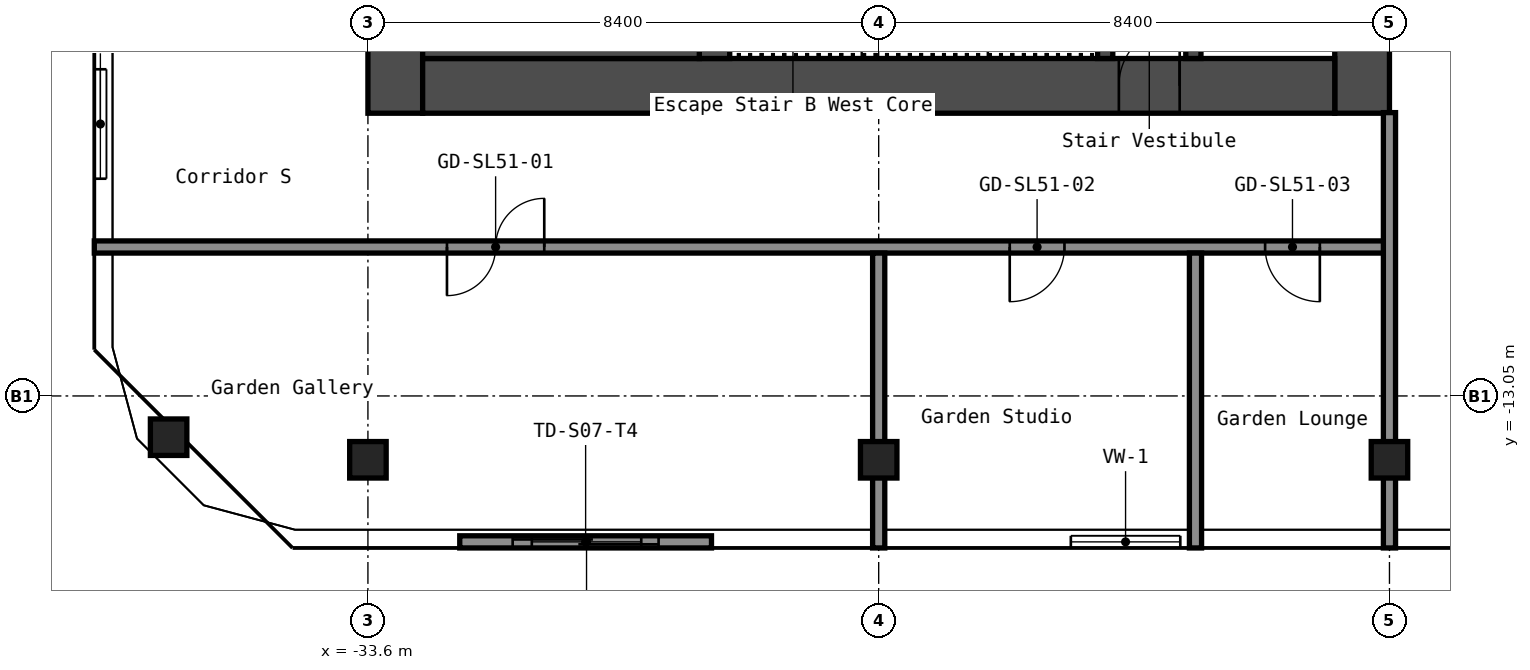
"""IFC4 building model, lengths in metres.
Left out: names, types, materials, properties, quantities, classifications, styles, units other than length and angle.
Written with IfcOpenShell. Run it as: python <this file> out.ifc"""

import sys

from ifc_helpers import new_model, si_unit, direction, frame, frame_2d, origin, origin_2d, place, context, subcontext, project, spatial, rectangle, hollow_rectangle, extrude, element, fill, save


model = new_model("IFC4")
c1 = context("Model", 3, precision=1e-05, world=origin(), true_north=direction((0.0, 1.0)))
c2 = subcontext(c1, "Body", "Model", "MODEL_VIEW")
j1 = project(units=[si_unit("LENGTHUNIT", "METRE"), si_unit("PLANEANGLEUNIT", "RADIAN")], contexts=[c1])
p1 = place(None, origin())
s1 = spatial("IfcSite", under=j1, at=p1, CompositionType="ELEMENT")
p2 = place(p1, origin())
s2 = spatial("IfcBuilding", under=s1, at=p2, CompositionType="ELEMENT")
p3 = place(p2, frame((0.0, 0.0, 180.2)))
s3 = spatial("IfcBuildingStorey", under=s2, at=p3, CompositionType="ELEMENT", Elevation=180.2)
for number, where, z_axis, x_axis in (
    (1, (-36.878, -13.729, 0.0), (0.0, 0.0, 1.0), (1.0, 0.0, 0.0)),
    (2, (-33.6, -14.1, 0.0), (0.0, 0.0, 1.0), (1.0, 0.0, 0.0)),
    (3, (-25.2, -14.1, 0.0), (0.0, 0.0, 1.0), (1.0, 0.0, 0.0)),
    (4, (-16.8, -14.1, 0.0), (0.0, 0.0, 1.0), (1.0, 0.0, 0.0)),
):
    element("IfcColumn", number, at=place(p3, frame(where, z_axis=z_axis, x_axis=x_axis)), inside=s3, PredefinedType="COLUMN", context=c2, shape_type="SweptSolid", body=[
        extrude(hollow_rectangle(XDim=0.6, YDim=0.6, WallThickness=0.025, InnerFilletRadius=0.038, OuterFilletRadius=0.062, at=origin_2d()), origin(), (0.0, 0.0, 1.0), 5.95),
    ])
p4 = place(p3, frame((-17.25, -8.4, 0.0), z_axis=(0.0, 0.0, 1.0), x_axis=(0.0, 1.0, 0.0)))
e5 = element("IfcWall", 5, at=p4, inside=s3, PredefinedType="SHEAR", context=c2, shape_type="SweptSolid", body=[
    extrude(rectangle(XDim=16.8, YDim=0.9, at=frame_2d((8.4, 0.0))), origin(), (0.0, 0.0, 1.0), 5.95),
])
p5 = place(p4, frame((10.1, 0.0, 0.0)))
e6 = element("IfcOpeningElement", 6, at=p5, cuts=e5, PredefinedType="OPENING", context=c2, shape_type="SweptSolid", body=[
    extrude(rectangle(XDim=1.6, YDim=2.1, at=frame_2d((0.8, 1.05))), frame((0.0, 0.46, 0.0), z_axis=(0.0, -1.0, 0.0), x_axis=(1.0, 0.0, 0.0)), (0.0, 0.0, 1.0), 0.92),
])
p6 = place(p3, frame((-33.15, -8.4, 0.0), z_axis=(0.0, 0.0, 1.0), x_axis=(0.0, 1.0, 0.0)))
e7 = element("IfcWall", 7, at=p6, inside=s3, PredefinedType="SHEAR", context=c2, shape_type="SweptSolid", body=[
    extrude(rectangle(XDim=16.8, YDim=0.9, at=frame_2d((8.4, 0.0))), origin(), (0.0, 0.0, 1.0), 5.95),
])
p7 = place(p3, frame((-32.7, -7.95, 0.0), z_axis=(0.0, 0.0, 1.0), x_axis=(1.0, 0.0, 0.0)))
e8 = element("IfcWall", 8, at=p7, inside=s3, PredefinedType="SHEAR", context=c2, shape_type="SweptSolid", body=[
    extrude(rectangle(XDim=15.0, YDim=0.9, at=frame_2d((7.5, 0.0))), origin(), (0.0, 0.0, 1.0), 5.95),
])
p8 = place(p7, frame((11.45, 0.0, 0.0)))
e9 = element("IfcOpeningElement", 9, at=p8, cuts=e8, PredefinedType="OPENING", context=c2, shape_type="SweptSolid", body=[
    extrude(rectangle(XDim=1.0, YDim=2.1, at=frame_2d((0.5, 1.05))), frame((0.0, 0.46, 0.0), z_axis=(0.0, -1.0, 0.0), x_axis=(1.0, 0.0, 0.0)), (0.0, 0.0, 1.0), 0.92),
])
p9 = place(p3, frame((-20.025, -7.5, 0.0), z_axis=(0.0, 0.0, 1.0), x_axis=(0.0, 1.0, 0.0)))
e10 = element("IfcWall", 10, at=p9, inside=s3, PredefinedType="SHEAR", context=c2, shape_type="SweptSolid", body=[
    extrude(rectangle(XDim=6.3, YDim=0.25, at=frame_2d((3.15, 0.0))), origin(), (0.0, 0.0, 1.0), 5.95),
])
p10 = place(p9, frame((2.4, 0.0, 0.0)))
e11 = element("IfcOpeningElement", 11, at=p10, cuts=e10, PredefinedType="OPENING", context=c2, shape_type="SweptSolid", body=[
    extrude(rectangle(XDim=1.0, YDim=2.1, at=frame_2d((0.5, 1.05))), frame((0.0, 0.135, 0.0), z_axis=(0.0, -1.0, 0.0), x_axis=(1.0, 0.0, 0.0)), (0.0, 0.0, 1.0), 0.27),
])
p11 = place(p3, frame((-21.475, -7.5, 0.0), z_axis=(0.0, 0.0, 1.0), x_axis=(0.0, 1.0, 0.0)))
e12 = element("IfcWall", 12, at=p11, inside=s3, PredefinedType="SHEAR", context=c2, shape_type="SweptSolid", body=[
    extrude(rectangle(XDim=3.75, YDim=0.25, at=frame_2d((1.875, 0.0))), origin(), (0.0, 0.0, 1.0), 5.95),
])
p12 = place(p11, frame((1.3, 0.0, 0.0)))
e13 = element("IfcOpeningElement", 13, at=p12, cuts=e12, PredefinedType="OPENING", context=c2, shape_type="SweptSolid", body=[
    extrude(rectangle(XDim=1.2, YDim=2.1, at=frame_2d((0.6, 1.05))), frame((0.0, 0.135, 0.0), z_axis=(0.0, -1.0, 0.0), x_axis=(1.0, 0.0, 0.0)), (0.0, 0.0, 1.0), 0.27),
])
p13 = place(p3, frame((-27.9, -7.5, 0.0), z_axis=(0.0, 0.0, 1.0), x_axis=(0.0, 1.0, 0.0)))
e14 = element("IfcWall", 14, at=p13, inside=s3, PredefinedType="SHEAR", context=c2, shape_type="SweptSolid", body=[
    extrude(rectangle(XDim=3.75, YDim=0.5, at=frame_2d((1.875, 0.0))), origin(), (0.0, 0.0, 1.0), 5.95),
])
p14 = place(p3, frame((-32.7, -6.75, 0.0), z_axis=(0.0, 0.0, 1.0), x_axis=(1.0, 0.0, 0.0)))
e15 = element("IfcWall", 15, at=p14, inside=s3, PredefinedType="SHEAR", context=c2, shape_type="SweptSolid", body=[
    extrude(rectangle(XDim=4.55, YDim=1.5, at=frame_2d((2.275, 0.0))), origin(), (0.0, 0.0, 1.0), 5.95),
])
p15 = place(p3, frame((-38.1, -10.6, 0.0), z_axis=(0.0, 0.0, 1.0), x_axis=(1.0, 0.0, 0.0)))
e16 = element("IfcWall", 16, at=p15, inside=s3, PredefinedType="PARTITIONING", context=c2, shape_type="SweptSolid", body=[
    extrude(rectangle(XDim=21.3, YDim=0.2, at=frame_2d((10.65, 0.0))), origin(), (0.0, 0.0, 1.0), 5.95),
])
p16 = place(p15, frame((5.8, 0.0, 0.0)))
e17 = element("IfcOpeningElement", 17, at=p16, cuts=e16, PredefinedType="OPENING", context=c2, shape_type="SweptSolid", body=[
    extrude(rectangle(XDim=1.6, YDim=2.1, at=frame_2d((0.8, 1.05))), frame((0.0, 0.11, 0.0), z_axis=(0.0, -1.0, 0.0), x_axis=(1.0, 0.0, 0.0)), (0.0, 0.0, 1.0), 0.22),
])
p17 = place(p15, frame((15.055, 0.0, 0.0)))
e18 = element("IfcOpeningElement", 18, at=p17, cuts=e16, PredefinedType="OPENING", context=c2, shape_type="SweptSolid", body=[
    extrude(rectangle(XDim=0.9, YDim=2.1, at=frame_2d((0.45, 1.05))), frame((0.0, 0.11, 0.0), z_axis=(0.0, -1.0, 0.0), x_axis=(1.0, 0.0, 0.0)), (0.0, 0.0, 1.0), 0.22),
])
p18 = place(p15, frame((19.255, 0.0, 0.0)))
e19 = element("IfcOpeningElement", 19, at=p18, cuts=e16, PredefinedType="OPENING", context=c2, shape_type="SweptSolid", body=[
    extrude(rectangle(XDim=0.9, YDim=2.1, at=frame_2d((0.45, 1.05))), frame((0.0, 0.11, 0.0), z_axis=(0.0, -1.0, 0.0), x_axis=(1.0, 0.0, 0.0)), (0.0, 0.0, 1.0), 0.22),
])
for number, where, z_axis, x_axis in (
    (20, (-25.2, -15.55, 0.0), (0.0, 0.0, 1.0), (0.0, 1.0, 0.0)),
    (21, (-19.99, -15.55, 0.0), (0.0, 0.0, 1.0), (0.0, 1.0, 0.0)),
):
    element("IfcWall", number, at=place(p3, frame(where, z_axis=z_axis, x_axis=x_axis)), inside=s3, PredefinedType="PARTITIONING", context=c2, shape_type="SweptSolid", body=[
        extrude(rectangle(XDim=4.85, YDim=0.2, at=frame_2d((2.425, 0.0))), origin(), (0.0, 0.0, 1.0), 5.95),
    ])
p19 = place(p3, frame((-16.8, -15.55, 0.0), z_axis=(0.0, 0.0, 1.0), x_axis=(0.0, 1.0, 0.0)))
e22 = element("IfcWall", 22, at=p19, inside=s3, PredefinedType="PARTITIONING", context=c2, shape_type="SweptSolid", body=[
    extrude(rectangle(XDim=7.16, YDim=0.2, at=frame_2d((3.58, 0.0))), origin(), (0.0, 0.0, 1.0), 5.95),
])
p20 = place(p3, frame((-38.0, -4.895, 4.45), z_axis=(0.0, 0.0, 1.0), x_axis=(0.0, -1.0, 0.0)))
p21 = place(p20, frame((2.782, 0.0, 0.25)))
p22 = place(p21, origin())
e23 = element("IfcWindow", 23, at=p22, inside=s3, PartitioningType="SINGLE_PANEL", PredefinedType="WINDOW", context=c2, shape_type="SweptSolid", body=[
    extrude(rectangle(XDim=1.8, YDim=0.9, at=frame_2d((0.9, 0.45))), frame((0.0, 0.03, 0.0), z_axis=(0.0, -1.0, 0.0), x_axis=(1.0, 0.0, 0.0)), (0.0, 0.0, 1.0), 0.06),
])
p23 = place(p3, frame((-34.81, -15.45, 4.45), z_axis=(0.0, 0.0, 1.0), x_axis=(1.0, 0.0, 0.0)))
p24 = place(p23, frame((3.905, 0.0, 0.25)))
p25 = place(p24, origin())
e24 = element("IfcWindow", 24, at=p25, inside=s3, PartitioningType="SINGLE_PANEL", PredefinedType="WINDOW", context=c2, shape_type="SweptSolid", body=[
    extrude(rectangle(XDim=1.8, YDim=0.9, at=frame_2d((0.9, 0.45))), frame((0.0, 0.03, 0.0), z_axis=(0.0, -1.0, 0.0), x_axis=(1.0, 0.0, 0.0)), (0.0, 0.0, 1.0), 0.06),
])
p26 = place(p3, frame((-25.2, -15.45, 4.45), z_axis=(0.0, 0.0, 1.0), x_axis=(1.0, 0.0, 0.0)))
p27 = place(p26, frame((3.16, 0.0, 0.25)))
p28 = place(p27, origin())
e25 = element("IfcWindow", 25, at=p28, inside=s3, PartitioningType="SINGLE_PANEL", PredefinedType="WINDOW", context=c2, shape_type="SweptSolid", body=[
    extrude(rectangle(XDim=1.8, YDim=0.9, at=frame_2d((0.9, 0.45))), frame((0.0, 0.03, 0.0), z_axis=(0.0, -1.0, 0.0), x_axis=(1.0, 0.0, 0.0)), (0.0, 0.0, 1.0), 0.06),
])
p29 = place(p3, frame((-32.09, -15.45, 0.0), z_axis=(0.0, 0.0, 1.0), x_axis=(1.0, 0.0, 0.0)))
p30 = place(p29, frame((0.87, 0.0, 0.0)))
p31 = place(p30, frame((2.4, 0.0, 0.0), z_axis=(0.0, 0.0, 1.0), x_axis=(-1.0, 0.0, 0.0)))
e26 = element("IfcDoor", 26, at=p31, inside=s3, OperationType="SLIDING_TO_LEFT", PredefinedType="DOOR", context=c2, shape_type="SweptSolid", body=[
    extrude(rectangle(XDim=2.4, YDim=2.2, at=frame_2d((1.2, 1.1))), frame((0.0, 0.025, 0.0), z_axis=(0.0, -1.0, 0.0), x_axis=(1.0, 0.0, 0.0)), (0.0, 0.0, 1.0), 0.05),
])
p32 = place(p8, origin())
e27 = element("IfcDoor", 27, at=p32, inside=s3, OperationType="SINGLE_SWING_LEFT", PredefinedType="DOOR", context=c2, shape_type="SweptSolid", body=[
    extrude(rectangle(XDim=1.0, YDim=2.1, at=frame_2d((0.5, 1.05))), frame((0.0, 0.025, 0.0), z_axis=(0.0, -1.0, 0.0), x_axis=(1.0, 0.0, 0.0)), (0.0, 0.0, 1.0), 0.05),
])
fill(e9, e27)
p33 = place(p16, origin())
e28 = element("IfcDoor", 28, at=p33, inside=s3, OperationType="DOUBLE_DOOR_SINGLE_SWING", PredefinedType="DOOR", context=c2, shape_type="SweptSolid", body=[
    extrude(rectangle(XDim=1.6, YDim=2.1, at=frame_2d((0.8, 1.05))), frame((0.0, 0.025, 0.0), z_axis=(0.0, -1.0, 0.0), x_axis=(1.0, 0.0, 0.0)), (0.0, 0.0, 1.0), 0.05),
])
fill(e17, e28)
p34 = place(p17, origin())
e29 = element("IfcDoor", 29, at=p34, inside=s3, OperationType="SINGLE_SWING_LEFT", PredefinedType="DOOR", context=c2, shape_type="SweptSolid", body=[
    extrude(rectangle(XDim=0.9, YDim=2.1, at=frame_2d((0.45, 1.05))), frame((0.0, 0.025, 0.0), z_axis=(0.0, -1.0, 0.0), x_axis=(1.0, 0.0, 0.0)), (0.0, 0.0, 1.0), 0.05),
])
fill(e18, e29)
p35 = place(p18, origin())
e30 = element("IfcDoor", 30, at=p35, inside=s3, OperationType="SINGLE_SWING_RIGHT", PredefinedType="DOOR", context=c2, shape_type="SweptSolid", body=[
    extrude(rectangle(XDim=0.9, YDim=2.1, at=frame_2d((0.45, 1.05))), frame((0.0, 0.025, 0.0), z_axis=(0.0, -1.0, 0.0), x_axis=(1.0, 0.0, 0.0)), (0.0, 0.0, 1.0), 0.05),
])
fill(e19, e30)
save(model, sys.argv[1])
